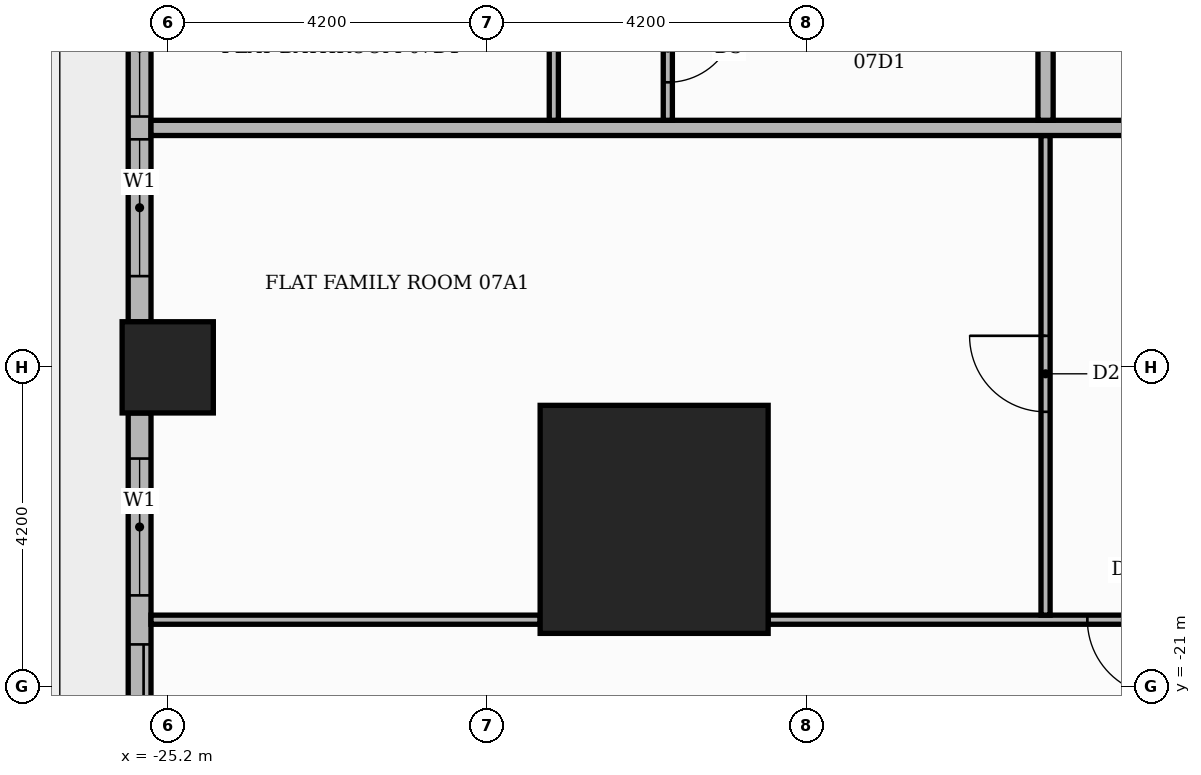
"""IFC4 building model, lengths in metres.
Left out: names, types, materials, properties, quantities, classifications, styles, units other than length and angle.
Written with IfcOpenShell. Run it as: python <this file> out.ifc"""

import sys

from ifc_helpers import new_model, si_unit, direction, frame, frame_2d, origin, origin_2d, place, context, subcontext, project, spatial, rectangle, extrude, element, fill, save


model = new_model("IFC4")
c1 = context("Model", 3, precision=1e-05, world=origin(), true_north=direction((0.0, 1.0)))
c2 = subcontext(c1, "Body", "Model", "MODEL_VIEW")
j1 = project(units=[si_unit("LENGTHUNIT", "METRE"), si_unit("PLANEANGLEUNIT", "RADIAN")], contexts=[c1])
p1 = place(None, origin())
s1 = spatial("IfcSite", under=j1, at=p1, CompositionType="ELEMENT")
p2 = place(p1, origin())
s2 = spatial("IfcBuilding", under=s1, at=p2, CompositionType="ELEMENT")
p3 = place(p2, frame((0.0, 0.0, 34.8)))
s3 = spatial("IfcBuildingStorey", under=s2, at=p3, CompositionType="ELEMENT", Elevation=34.8)
p4 = place(p3, frame((-18.8, -18.8, 0.0), z_axis=(0.0, 0.0, 1.0), x_axis=(1.0, 0.0, 0.0)))
e1 = element("IfcColumn", 1, at=p4, inside=s3, PredefinedType="COLUMN", context=c2, shape_type="SweptSolid", body=[
    extrude(rectangle(XDim=3.0, YDim=3.0, at=origin_2d()), origin(), (0.0, 0.0, 1.0), 3.9),
])
p5 = place(p3, frame((-25.2, -16.8, 0.0), z_axis=(0.0, 0.0, 1.0), x_axis=(1.0, 0.0, 0.0)))
e2 = element("IfcColumn", 2, at=p5, inside=s3, PredefinedType="COLUMN", context=c2, shape_type="SweptSolid", body=[
    extrude(rectangle(XDim=1.2, YDim=1.2, at=origin_2d()), origin(), (0.0, 0.0, 1.0), 3.9),
])
p6 = place(p3, frame((-25.57, -9.0, 0.0), z_axis=(0.0, 0.0, 1.0), x_axis=(0.0, -1.0, 0.0)))
e3 = element("IfcWall", 3, at=p6, inside=s3, PredefinedType="STANDARD", context=c2, shape_type="SweptSolid", body=[
    extrude(rectangle(XDim=7.2, YDim=0.3, at=frame_2d((3.6, 0.0))), origin(), (0.0, 0.0, 1.0), 3.48),
])
p7 = place(p6, frame((0.6, 0.0, 0.9)))
e4 = element("IfcOpeningElement", 4, at=p7, cuts=e3, PredefinedType="OPENING", context=c2, shape_type="SweptSolid", body=[
    extrude(rectangle(XDim=1.8, YDim=2.1, at=frame_2d((0.9, 1.05))), frame((0.0, 0.16, 0.0), z_axis=(0.0, -1.0, 0.0), x_axis=(1.0, 0.0, 0.0)), (0.0, 0.0, 1.0), 0.32),
])
p8 = place(p6, frame((2.7, 0.0, 0.9)))
e5 = element("IfcOpeningElement", 5, at=p8, cuts=e3, PredefinedType="OPENING", context=c2, shape_type="SweptSolid", body=[
    extrude(rectangle(XDim=1.8, YDim=2.1, at=frame_2d((0.9, 1.05))), frame((0.0, 0.16, 0.0), z_axis=(0.0, -1.0, 0.0), x_axis=(1.0, 0.0, 0.0)), (0.0, 0.0, 1.0), 0.32),
])
p9 = place(p6, frame((4.8, 0.0, 0.9)))
e6 = element("IfcOpeningElement", 6, at=p9, cuts=e3, PredefinedType="OPENING", context=c2, shape_type="SweptSolid", body=[
    extrude(rectangle(XDim=1.8, YDim=2.1, at=frame_2d((0.9, 1.05))), frame((0.0, 0.16, 0.0), z_axis=(0.0, -1.0, 0.0), x_axis=(1.0, 0.0, 0.0)), (0.0, 0.0, 1.0), 0.32),
])
p10 = place(p3, frame((-25.57, -17.4, 0.0), z_axis=(0.0, 0.0, 1.0), x_axis=(0.0, -1.0, 0.0)))
e7 = element("IfcWall", 7, at=p10, inside=s3, PredefinedType="STANDARD", context=c2, shape_type="SweptSolid", body=[
    extrude(rectangle(XDim=5.32, YDim=0.3, at=frame_2d((2.66, 0.0))), origin(), (0.0, 0.0, 1.0), 3.48),
])
p11 = place(p10, frame((0.6, 0.0, 0.9)))
e8 = element("IfcOpeningElement", 8, at=p11, cuts=e7, PredefinedType="OPENING", context=c2, shape_type="SweptSolid", body=[
    extrude(rectangle(XDim=1.8, YDim=2.1, at=frame_2d((0.9, 1.05))), frame((0.0, 0.16, 0.0), z_axis=(0.0, -1.0, 0.0), x_axis=(1.0, 0.0, 0.0)), (0.0, 0.0, 1.0), 0.32),
])
p12 = place(p10, frame((3.045, 0.0, 0.0)))
e9 = element("IfcOpeningElement", 9, at=p12, cuts=e7, PredefinedType="OPENING", context=c2, shape_type="SweptSolid", body=[
    extrude(rectangle(XDim=1.8, YDim=2.4, at=frame_2d((0.9, 1.2))), frame((0.0, 0.16, 0.0), z_axis=(0.0, -1.0, 0.0), x_axis=(1.0, 0.0, 0.0)), (0.0, 0.0, 1.0), 0.32),
])
p13 = place(p3, frame((-25.42, -20.12, 0.0), z_axis=(0.0, 0.0, 1.0), x_axis=(1.0, 0.0, 0.0)))
e10 = element("IfcWall", 10, at=p13, inside=s3, PredefinedType="PARTITIONING", context=c2, shape_type="SweptSolid", body=[
    extrude(rectangle(XDim=5.12, YDim=0.12, at=frame_2d((2.56, 0.0))), origin(), (0.0, 0.0, 1.0), 3.48),
])
p14 = place(p3, frame((-17.3, -20.12, 0.0), z_axis=(0.0, 0.0, 1.0), x_axis=(1.0, 0.0, 0.0)))
e11 = element("IfcWall", 11, at=p14, inside=s3, PredefinedType="PARTITIONING", context=c2, shape_type="SweptSolid", body=[
    extrude(rectangle(XDim=12.05, YDim=0.12, at=frame_2d((6.025, 0.0))), origin(), (0.0, 0.0, 1.0), 3.48),
])
p15 = place(p14, frame((4.2, 0.0, 0.0)))
e12 = element("IfcOpeningElement", 12, at=p15, cuts=e11, PredefinedType="OPENING", context=c2, shape_type="SweptSolid", body=[
    extrude(rectangle(XDim=1.0, YDim=2.1, at=frame_2d((0.5, 1.05))), frame((0.0, 0.07, 0.0), z_axis=(0.0, -1.0, 0.0), x_axis=(1.0, 0.0, 0.0)), (0.0, 0.0, 1.0), 0.14),
])
p16 = place(p14, frame((8.4, 0.0, 0.0)))
e13 = element("IfcOpeningElement", 13, at=p16, cuts=e11, PredefinedType="OPENING", context=c2, shape_type="SweptSolid", body=[
    extrude(rectangle(XDim=1.0, YDim=2.1, at=frame_2d((0.5, 1.05))), frame((0.0, 0.07, 0.0), z_axis=(0.0, -1.0, 0.0), x_axis=(1.0, 0.0, 0.0)), (0.0, 0.0, 1.0), 0.14),
])
p17 = place(p3, frame((-13.65, -20.06, 0.0), z_axis=(0.0, 0.0, 1.0), x_axis=(0.0, 1.0, 0.0)))
e14 = element("IfcWall", 14, at=p17, inside=s3, PredefinedType="PARTITIONING", context=c2, shape_type="SweptSolid", body=[
    extrude(rectangle(XDim=6.31, YDim=0.12, at=frame_2d((3.155, 0.0))), origin(), (0.0, 0.0, 1.0), 3.48),
])
p18 = place(p17, frame((2.675, 0.0, 0.0)))
e15 = element("IfcOpeningElement", 15, at=p18, cuts=e14, PredefinedType="OPENING", context=c2, shape_type="SweptSolid", body=[
    extrude(rectangle(XDim=1.0, YDim=2.1, at=frame_2d((0.5, 1.05))), frame((0.0, 0.07, 0.0), z_axis=(0.0, -1.0, 0.0), x_axis=(1.0, 0.0, 0.0)), (0.0, 0.0, 1.0), 0.14),
])
p19 = place(p3, frame((-25.42, -13.65, 0.0), z_axis=(0.0, 0.0, 1.0), x_axis=(1.0, 0.0, 0.0)))
e16 = element("IfcWall", 16, at=p19, inside=s3, PredefinedType="PARTITIONING", context=c2, shape_type="SweptSolid", body=[
    extrude(rectangle(XDim=39.07, YDim=0.2, at=frame_2d((19.535, 0.0))), origin(), (0.0, 0.0, 1.0), 3.48),
])
p20 = place(p19, frame((14.37, 0.0, 0.0)))
e17 = element("IfcOpeningElement", 17, at=p20, cuts=e16, PredefinedType="OPENING", context=c2, shape_type="SweptSolid", body=[
    extrude(rectangle(XDim=1.1, YDim=2.4, at=frame_2d((0.55, 1.2))), frame((0.0, 0.11, 0.0), z_axis=(0.0, -1.0, 0.0), x_axis=(1.0, 0.0, 0.0)), (0.0, 0.0, 1.0), 0.22),
])
p21 = place(p3, frame((-20.12, -13.55, 0.0), z_axis=(0.0, 0.0, 1.0), x_axis=(0.0, 1.0, 0.0)))
e18 = element("IfcWall", 18, at=p21, inside=s3, PredefinedType="PARTITIONING", context=c2, shape_type="SweptSolid", body=[
    extrude(rectangle(XDim=1.94, YDim=0.12, at=frame_2d((0.97, 0.0))), origin(), (0.0, 0.0, 1.0), 3.48),
])
p22 = place(p3, frame((-18.62, -13.55, 0.0), z_axis=(0.0, 0.0, 1.0), x_axis=(0.0, 1.0, 0.0)))
e19 = element("IfcWall", 19, at=p22, inside=s3, PredefinedType="PARTITIONING", context=c2, shape_type="SweptSolid", body=[
    extrude(rectangle(XDim=1.94, YDim=0.12, at=frame_2d((0.97, 0.0))), origin(), (0.0, 0.0, 1.0), 3.48),
])
p23 = place(p22, frame((0.5, 0.0, 0.0)))
e20 = element("IfcOpeningElement", 20, at=p23, cuts=e19, PredefinedType="OPENING", context=c2, shape_type="SweptSolid", body=[
    extrude(rectangle(XDim=0.9, YDim=2.1, at=frame_2d((0.45, 1.05))), frame((0.0, 0.07, 0.0), z_axis=(0.0, -1.0, 0.0), x_axis=(1.0, 0.0, 0.0)), (0.0, 0.0, 1.0), 0.14),
])
p24 = place(p3, frame((-13.65, -13.55, 0.0), z_axis=(0.0, 0.0, 1.0), x_axis=(0.0, 1.0, 0.0)))
e21 = element("IfcWall", 21, at=p24, inside=s3, PredefinedType="PARTITIONING", context=c2, shape_type="SweptSolid", body=[
    extrude(rectangle(XDim=27.1, YDim=0.2, at=frame_2d((13.55, 0.0))), origin(), (0.0, 0.0, 1.0), 3.48),
])
p25 = place(p24, frame((24.55, 0.0, 0.0)))
e22 = element("IfcOpeningElement", 22, at=p25, cuts=e21, PredefinedType="OPENING", context=c2, shape_type="SweptSolid", body=[
    extrude(rectangle(XDim=1.1, YDim=2.4, at=frame_2d((0.55, 1.2))), frame((0.0, 0.11, 0.0), z_axis=(0.0, -1.0, 0.0), x_axis=(1.0, 0.0, 0.0)), (0.0, 0.0, 1.0), 0.22),
])
p26 = place(p8, origin())
e23 = element("IfcWindow", 23, at=p26, inside=s3, PartitioningType="SINGLE_PANEL", PredefinedType="WINDOW", context=c2, shape_type="SweptSolid", body=[
    extrude(rectangle(XDim=1.8, YDim=2.1, at=frame_2d((0.9, 1.05))), frame((0.0, 0.03, 0.0), z_axis=(0.0, -1.0, 0.0), x_axis=(1.0, 0.0, 0.0)), (0.0, 0.0, 1.0), 0.06),
])
fill(e5, e23)
p27 = place(p9, origin())
e24 = element("IfcWindow", 24, at=p27, inside=s3, PartitioningType="SINGLE_PANEL", PredefinedType="WINDOW", context=c2, shape_type="SweptSolid", body=[
    extrude(rectangle(XDim=1.8, YDim=2.1, at=frame_2d((0.9, 1.05))), frame((0.0, 0.03, 0.0), z_axis=(0.0, -1.0, 0.0), x_axis=(1.0, 0.0, 0.0)), (0.0, 0.0, 1.0), 0.06),
])
fill(e6, e24)
p28 = place(p11, origin())
e25 = element("IfcWindow", 25, at=p28, inside=s3, PartitioningType="SINGLE_PANEL", PredefinedType="WINDOW", context=c2, shape_type="SweptSolid", body=[
    extrude(rectangle(XDim=1.8, YDim=2.1, at=frame_2d((0.9, 1.05))), frame((0.0, 0.03, 0.0), z_axis=(0.0, -1.0, 0.0), x_axis=(1.0, 0.0, 0.0)), (0.0, 0.0, 1.0), 0.06),
])
fill(e8, e25)
p29 = place(p12, origin())
e26 = element("IfcDoor", 26, at=p29, inside=s3, OperationType="SLIDING_TO_RIGHT", PredefinedType="DOOR", context=c2, shape_type="SweptSolid", body=[
    extrude(rectangle(XDim=1.8, YDim=2.4, at=frame_2d((0.9, 1.2))), frame((0.0, 0.025, 0.0), z_axis=(0.0, -1.0, 0.0), x_axis=(1.0, 0.0, 0.0)), (0.0, 0.0, 1.0), 0.05),
])
fill(e9, e26)
p30 = place(p18, origin())
e27 = element("IfcDoor", 27, at=p30, inside=s3, OperationType="SINGLE_SWING_RIGHT", PredefinedType="DOOR", context=c2, shape_type="SweptSolid", body=[
    extrude(rectangle(XDim=1.0, YDim=2.1, at=frame_2d((0.5, 1.05))), frame((0.0, 0.025, 0.0), z_axis=(0.0, -1.0, 0.0), x_axis=(1.0, 0.0, 0.0)), (0.0, 0.0, 1.0), 0.05),
])
fill(e15, e27)
p31 = place(p15, frame((1.0, 0.0, 0.0), z_axis=(0.0, 0.0, 1.0), x_axis=(-1.0, 0.0, 0.0)))
e28 = element("IfcDoor", 28, at=p31, inside=s3, OperationType="SINGLE_SWING_RIGHT", PredefinedType="DOOR", context=c2, shape_type="SweptSolid", body=[
    extrude(rectangle(XDim=1.0, YDim=2.1, at=frame_2d((0.5, 1.05))), frame((0.0, 0.025, 0.0), z_axis=(0.0, -1.0, 0.0), x_axis=(1.0, 0.0, 0.0)), (0.0, 0.0, 1.0), 0.05),
])
fill(e12, e28)
p32 = place(p23, frame((0.9, 0.0, 0.0), z_axis=(0.0, 0.0, 1.0), x_axis=(-1.0, 0.0, 0.0)))
e29 = element("IfcDoor", 29, at=p32, inside=s3, OperationType="SINGLE_SWING_RIGHT", PredefinedType="DOOR", context=c2, shape_type="SweptSolid", body=[
    extrude(rectangle(XDim=0.9, YDim=2.1, at=frame_2d((0.45, 1.05))), frame((0.0, 0.025, 0.0), z_axis=(0.0, -1.0, 0.0), x_axis=(1.0, 0.0, 0.0)), (0.0, 0.0, 1.0), 0.05),
])
fill(e20, e29)
save(model, sys.argv[1])
